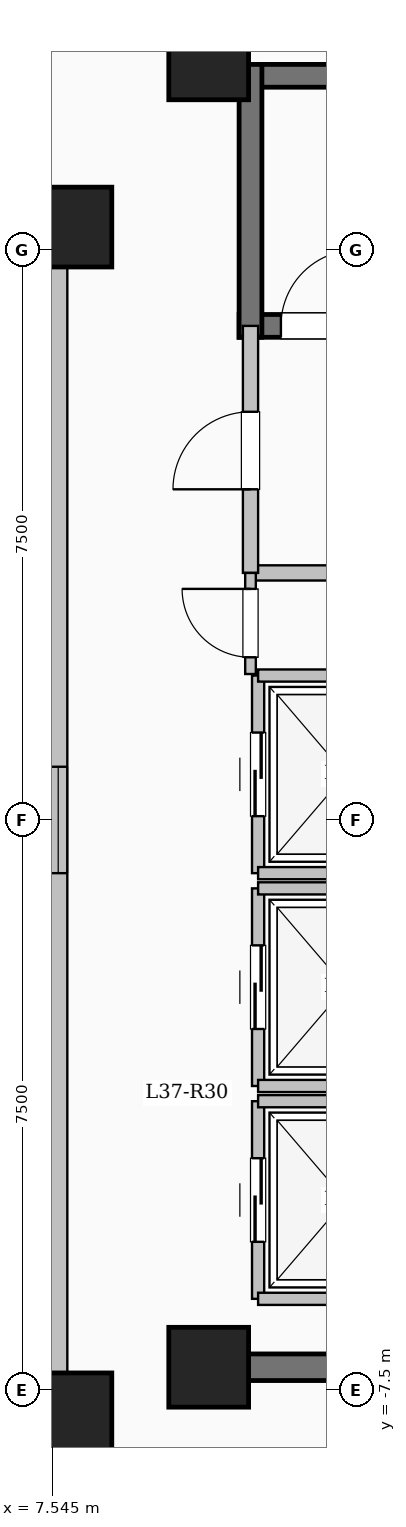
"""IFC4 building model, lengths in metres.
Left out: names, types, materials, properties, quantities, classifications, styles, units other than length and angle.
Written with IfcOpenShell. Run it as: python <this file> out.ifc"""

import sys

from ifc_helpers import new_model, si_unit, direction, frame, frame_2d, origin, origin_2d, place, context, subcontext, project, spatial, rectangle, extrude, element, fill, save


model = new_model("IFC4")
c1 = context("Model", 3, precision=1e-05, world=origin(), true_north=direction((0.0, 1.0)))
c2 = subcontext(c1, "Body", "Model", "MODEL_VIEW")
j1 = project(units=[si_unit("LENGTHUNIT", "METRE"), si_unit("PLANEANGLEUNIT", "RADIAN")], contexts=[c1])
p1 = place(None, origin())
s1 = spatial("IfcSite", under=j1, at=p1, CompositionType="ELEMENT")
p2 = place(p1, origin())
s2 = spatial("IfcBuilding", under=s1, at=p2, CompositionType="ELEMENT")
p3 = place(p2, frame((0.0, 0.0, 139.3)))
s3 = spatial("IfcBuildingStorey", under=s2, at=p3, CompositionType="ELEMENT", Elevation=139.3)
for number, where, z_axis, x_axis in (
    (1, (7.8, -7.8, 0.0), (0.0, 0.0, 1.0), (1.0, 0.0, 0.0)),
    (2, (7.8, 7.8, 0.0), (0.0, 0.0, 1.0), (1.0, 0.0, 0.0)),
    (3, (9.6, -7.2, 0.0), (0.0, 0.0, 1.0), (1.0, 0.0, 0.0)),
    (4, (9.6, 10.0, 0.0), (0.0, 0.0, 1.0), (1.0, 0.0, 0.0)),
):
    element("IfcColumn", number, at=place(p3, frame(where, z_axis=z_axis, x_axis=x_axis)), inside=s3, PredefinedType="COLUMN", context=c2, shape_type="SweptSolid", body=[
        extrude(rectangle(XDim=1.05, YDim=1.05, at=origin_2d()), origin(), (0.0, 0.0, 1.0), 3.35),
    ])
p4 = place(p3, frame((-7.62, -7.62, 0.0), z_axis=(0.0, 0.0, 1.0), x_axis=(1.0, 0.0, 0.0)))
e5 = element("IfcWall", 5, at=p4, inside=s3, PredefinedType="SOLIDWALL", context=c2, shape_type="SweptSolid", body=[
    extrude(rectangle(XDim=15.24, YDim=0.24, at=frame_2d((7.62, 0.0))), origin(), (0.0, 0.0, 1.0), 3.1),
])
p5 = place(p4, frame((6.92, 0.0, 0.95)))
e6 = element("IfcOpeningElement", 6, at=p5, cuts=e5, PredefinedType="OPENING", context=c2, shape_type="SweptSolid", body=[
    extrude(rectangle(XDim=1.4, YDim=1.5, at=frame_2d((0.7, 0.75))), frame((0.0, 0.13, 0.0), z_axis=(0.0, -1.0, 0.0), x_axis=(1.0, 0.0, 0.0)), (0.0, 0.0, 1.0), 0.26),
])
p6 = place(p3, frame((7.62, -7.62, 0.0), z_axis=(0.0, 0.0, 1.0), x_axis=(0.0, 1.0, 0.0)))
e7 = element("IfcWall", 7, at=p6, inside=s3, PredefinedType="SOLIDWALL", context=c2, shape_type="SweptSolid", body=[
    extrude(rectangle(XDim=15.24, YDim=0.24, at=frame_2d((7.62, 0.0))), origin(), (0.0, 0.0, 1.0), 3.1),
])
p7 = place(p6, frame((6.92, 0.0, 0.95)))
e8 = element("IfcOpeningElement", 8, at=p7, cuts=e7, PredefinedType="OPENING", context=c2, shape_type="SweptSolid", body=[
    extrude(rectangle(XDim=1.4, YDim=1.5, at=frame_2d((0.7, 0.75))), frame((0.0, 0.13, 0.0), z_axis=(0.0, -1.0, 0.0), x_axis=(1.0, 0.0, 0.0)), (0.0, 0.0, 1.0), 0.26),
])
p8 = place(p3, frame((7.62, 7.62, 0.0), z_axis=(0.0, 0.0, 1.0), x_axis=(-1.0, 0.0, 0.0)))
e9 = element("IfcWall", 9, at=p8, inside=s3, PredefinedType="SOLIDWALL", context=c2, shape_type="SweptSolid", body=[
    extrude(rectangle(XDim=15.24, YDim=0.24, at=frame_2d((7.62, 0.0))), origin(), (0.0, 0.0, 1.0), 3.1),
])
p9 = place(p8, frame((6.92, 0.0, 0.95)))
e10 = element("IfcOpeningElement", 10, at=p9, cuts=e9, PredefinedType="OPENING", context=c2, shape_type="SweptSolid", body=[
    extrude(rectangle(XDim=1.4, YDim=1.5, at=frame_2d((0.7, 0.75))), frame((0.0, 0.13, 0.0), z_axis=(0.0, -1.0, 0.0), x_axis=(1.0, 0.0, 0.0)), (0.0, 0.0, 1.0), 0.26),
])
p10 = place(p3, frame((10.0, 9.79, 0.0), z_axis=(0.0, 0.0, 1.0), x_axis=(1.0, 0.0, 0.0)))
e11 = element("IfcWall", 11, at=p10, inside=s3, PredefinedType="SHEAR", context=c2, shape_type="SweptSolid", body=[
    extrude(rectangle(XDim=8.0, YDim=0.3, at=frame_2d((4.0, 0.0))), origin(), (0.0, 0.0, 1.0), 3.35),
])
p11 = place(p3, frame((10.0, 6.5, 0.0), z_axis=(0.0, 0.0, 1.0), x_axis=(1.0, 0.0, 0.0)))
e12 = element("IfcWall", 12, at=p11, inside=s3, PredefinedType="SHEAR", context=c2, shape_type="SweptSolid", body=[
    extrude(rectangle(XDim=8.0, YDim=0.3, at=frame_2d((4.0, 0.0))), origin(), (0.0, 0.0, 1.0), 3.35),
])
p12 = place(p11, frame((0.55, 0.0, 0.0)))
e13 = element("IfcOpeningElement", 13, at=p12, cuts=e12, PredefinedType="OPENING", context=c2, shape_type="SweptSolid", body=[
    extrude(rectangle(XDim=1.0, YDim=2.15, at=frame_2d((0.5, 1.075))), frame((0.0, 0.16, 0.0), z_axis=(0.0, -1.0, 0.0), x_axis=(1.0, 0.0, 0.0)), (0.0, 0.0, 1.0), 0.32),
])
p13 = place(p3, frame((10.15, 6.35, 0.0), z_axis=(0.0, 0.0, 1.0), x_axis=(0.0, 1.0, 0.0)))
e14 = element("IfcWall", 14, at=p13, inside=s3, PredefinedType="SHEAR", context=c2, shape_type="SweptSolid", body=[
    extrude(rectangle(XDim=3.59, YDim=0.3, at=frame_2d((1.795, 0.0))), origin(), (0.0, 0.0, 1.0), 3.35),
])
p14 = place(p3, frame((10.15, 3.25, 0.0), z_axis=(0.0, 0.0, 1.0), x_axis=(1.0, 0.0, 0.0)))
e15 = element("IfcWall", 15, at=p14, inside=s3, PredefinedType="SOLIDWALL", context=c2, shape_type="SweptSolid", body=[
    extrude(rectangle(XDim=5.4, YDim=0.2, at=frame_2d((2.7, 0.0))), origin(), (0.0, 0.0, 1.0), 3.1),
])
p15 = place(p3, frame((10.15, 3.25, 0.0), z_axis=(0.0, 0.0, 1.0), x_axis=(0.0, 1.0, 0.0)))
e16 = element("IfcWall", 16, at=p15, inside=s3, PredefinedType="SOLIDWALL", context=c2, shape_type="SweptSolid", body=[
    extrude(rectangle(XDim=3.25, YDim=0.2, at=frame_2d((1.625, 0.0))), origin(), (0.0, 0.0, 1.0), 3.1),
])
p16 = place(p15, frame((1.1, 0.0, 0.0)))
e17 = element("IfcOpeningElement", 17, at=p16, cuts=e16, PredefinedType="OPENING", context=c2, shape_type="SweptSolid", body=[
    extrude(rectangle(XDim=1.02, YDim=2.15, at=frame_2d((0.51, 1.075))), frame((0.0, 0.11, 0.0), z_axis=(0.0, -1.0, 0.0), x_axis=(1.0, 0.0, 0.0)), (0.0, 0.0, 1.0), 0.22),
])
p17 = place(p3, frame((10.25, -6.3, 0.0), z_axis=(0.0, 0.0, 1.0), x_axis=(0.0, 1.0, 0.0)))
e18 = element("IfcWall", 18, at=p17, inside=s3, PredefinedType="SOLIDWALL", context=c2, shape_type="SweptSolid", body=[
    extrude(rectangle(XDim=2.6, YDim=0.16, at=frame_2d((1.3, 0.0))), origin(), (0.0, 0.0, 1.0), 3.1),
])
p18 = place(p17, frame((0.75, 0.0, 0.0)))
e19 = element("IfcOpeningElement", 19, at=p18, cuts=e18, PredefinedType="OPENING", context=c2, shape_type="SweptSolid", body=[
    extrude(rectangle(XDim=1.1, YDim=2.15, at=frame_2d((0.55, 1.075))), frame((0.0, 0.09, 0.0), z_axis=(0.0, -1.0, 0.0), x_axis=(1.0, 0.0, 0.0)), (0.0, 0.0, 1.0), 0.18),
])
for number, where, z_axis, x_axis in (
    (20, (10.25, -6.3, 0.0), (0.0, 0.0, 1.0), (1.0, 0.0, 0.0)),
    (21, (10.25, -3.7, 0.0), (0.0, 0.0, 1.0), (1.0, 0.0, 0.0)),
):
    element("IfcWall", number, at=place(p3, frame(where, z_axis=z_axis, x_axis=x_axis)), inside=s3, PredefinedType="SOLIDWALL", context=c2, shape_type="SweptSolid", body=[
        extrude(rectangle(XDim=2.3, YDim=0.16, at=frame_2d((1.15, 0.0))), origin(), (0.0, 0.0, 1.0), 3.1),
    ])
p19 = place(p3, frame((10.25, -3.5, 0.0), z_axis=(0.0, 0.0, 1.0), x_axis=(0.0, 1.0, 0.0)))
e22 = element("IfcWall", 22, at=p19, inside=s3, PredefinedType="SOLIDWALL", context=c2, shape_type="SweptSolid", body=[
    extrude(rectangle(XDim=2.6, YDim=0.16, at=frame_2d((1.3, 0.0))), origin(), (0.0, 0.0, 1.0), 3.1),
])
p20 = place(p19, frame((0.75, 0.0, 0.0)))
e23 = element("IfcOpeningElement", 23, at=p20, cuts=e22, PredefinedType="OPENING", context=c2, shape_type="SweptSolid", body=[
    extrude(rectangle(XDim=1.1, YDim=2.15, at=frame_2d((0.55, 1.075))), frame((0.0, 0.09, 0.0), z_axis=(0.0, -1.0, 0.0), x_axis=(1.0, 0.0, 0.0)), (0.0, 0.0, 1.0), 0.18),
])
for number, where, z_axis, x_axis in (
    (24, (10.25, -3.5, 0.0), (0.0, 0.0, 1.0), (1.0, 0.0, 0.0)),
    (25, (10.25, -0.9, 0.0), (0.0, 0.0, 1.0), (1.0, 0.0, 0.0)),
):
    element("IfcWall", number, at=place(p3, frame(where, z_axis=z_axis, x_axis=x_axis)), inside=s3, PredefinedType="SOLIDWALL", context=c2, shape_type="SweptSolid", body=[
        extrude(rectangle(XDim=2.3, YDim=0.16, at=frame_2d((1.15, 0.0))), origin(), (0.0, 0.0, 1.0), 3.1),
    ])
p21 = place(p3, frame((10.25, -0.7, 0.0), z_axis=(0.0, 0.0, 1.0), x_axis=(0.0, 1.0, 0.0)))
e26 = element("IfcWall", 26, at=p21, inside=s3, PredefinedType="SOLIDWALL", context=c2, shape_type="SweptSolid", body=[
    extrude(rectangle(XDim=2.6, YDim=0.16, at=frame_2d((1.3, 0.0))), origin(), (0.0, 0.0, 1.0), 3.1),
])
p22 = place(p21, frame((0.75, 0.0, 0.0)))
e27 = element("IfcOpeningElement", 27, at=p22, cuts=e26, PredefinedType="OPENING", context=c2, shape_type="SweptSolid", body=[
    extrude(rectangle(XDim=1.1, YDim=2.15, at=frame_2d((0.55, 1.075))), frame((0.0, 0.09, 0.0), z_axis=(0.0, -1.0, 0.0), x_axis=(1.0, 0.0, 0.0)), (0.0, 0.0, 1.0), 0.18),
])
for number, where, z_axis, x_axis in (
    (28, (10.25, -0.7, 0.0), (0.0, 0.0, 1.0), (1.0, 0.0, 0.0)),
    (29, (10.25, 1.9, 0.0), (0.0, 0.0, 1.0), (1.0, 0.0, 0.0)),
):
    element("IfcWall", number, at=place(p3, frame(where, z_axis=z_axis, x_axis=x_axis)), inside=s3, PredefinedType="SOLIDWALL", context=c2, shape_type="SweptSolid", body=[
        extrude(rectangle(XDim=2.3, YDim=0.16, at=frame_2d((1.15, 0.0))), origin(), (0.0, 0.0, 1.0), 3.1),
    ])
p23 = place(p3, frame((10.075, -7.2, 0.0), z_axis=(0.0, 0.0, 1.0), x_axis=(1.0, 0.0, 0.0)))
e30 = element("IfcWall", 30, at=p23, inside=s3, PredefinedType="SHEAR", context=c2, shape_type="SweptSolid", body=[
    extrude(rectangle(XDim=8.55, YDim=0.35, at=frame_2d((4.275, 0.0))), origin(), (0.0, 0.0, 1.0), 3.35),
])
p24 = place(p3, frame((10.15, 1.92, 0.0), z_axis=(0.0, 0.0, 1.0), x_axis=(0.0, 1.0, 0.0)))
e31 = element("IfcWall", 31, at=p24, inside=s3, PredefinedType="PARTITIONING", context=c2, shape_type="SweptSolid", body=[
    extrude(rectangle(XDim=1.33, YDim=0.14, at=frame_2d((0.665, 0.0))), origin(), (0.0, 0.0, 1.0), 3.1),
])
p25 = place(p24, frame((0.22, 0.0, 0.0)))
e32 = element("IfcOpeningElement", 32, at=p25, cuts=e31, PredefinedType="OPENING", context=c2, shape_type="SweptSolid", body=[
    extrude(rectangle(XDim=0.9, YDim=2.08, at=frame_2d((0.45, 1.04))), frame((0.0, 0.08, 0.0), z_axis=(0.0, -1.0, 0.0), x_axis=(1.0, 0.0, 0.0)), (0.0, 0.0, 1.0), 0.16),
])
p26 = place(p7, origin())
e33 = element("IfcWindow", 33, at=p26, inside=s3, PartitioningType="SINGLE_PANEL", PredefinedType="WINDOW", context=c2, shape_type="SweptSolid", body=[
    extrude(rectangle(XDim=1.4, YDim=1.5, at=frame_2d((0.7, 0.75))), frame((0.0, 0.03, 0.0), z_axis=(0.0, -1.0, 0.0), x_axis=(1.0, 0.0, 0.0)), (0.0, 0.0, 1.0), 0.06),
])
fill(e8, e33)
p27 = place(p12, origin())
e34 = element("IfcDoor", 34, at=p27, inside=s3, OperationType="SINGLE_SWING_RIGHT", PredefinedType="DOOR", context=c2, shape_type="SweptSolid", body=[
    extrude(rectangle(XDim=1.0, YDim=2.15, at=frame_2d((0.5, 1.075))), frame((0.0, 0.025, 0.0), z_axis=(0.0, -1.0, 0.0), x_axis=(1.0, 0.0, 0.0)), (0.0, 0.0, 1.0), 0.05),
])
fill(e13, e34)
p28 = place(p16, origin())
e35 = element("IfcDoor", 35, at=p28, inside=s3, OperationType="SINGLE_SWING_LEFT", PredefinedType="DOOR", context=c2, shape_type="SweptSolid", body=[
    extrude(rectangle(XDim=1.02, YDim=2.15, at=frame_2d((0.51, 1.075))), frame((0.0, 0.025, 0.0), z_axis=(0.0, -1.0, 0.0), x_axis=(1.0, 0.0, 0.0)), (0.0, 0.0, 1.0), 0.05),
])
fill(e17, e35)
p29 = place(p18, origin())
e36 = element("IfcDoor", 36, at=p29, inside=s3, OperationType="SLIDING_TO_LEFT", PredefinedType="DOOR", context=c2, shape_type="SweptSolid", body=[
    extrude(rectangle(XDim=1.1, YDim=2.15, at=frame_2d((0.55, 1.075))), frame((0.0, 0.025, 0.0), z_axis=(0.0, -1.0, 0.0), x_axis=(1.0, 0.0, 0.0)), (0.0, 0.0, 1.0), 0.05),
])
fill(e19, e36)
p30 = place(p20, origin())
e37 = element("IfcDoor", 37, at=p30, inside=s3, OperationType="SLIDING_TO_LEFT", PredefinedType="DOOR", context=c2, shape_type="SweptSolid", body=[
    extrude(rectangle(XDim=1.1, YDim=2.15, at=frame_2d((0.55, 1.075))), frame((0.0, 0.025, 0.0), z_axis=(0.0, -1.0, 0.0), x_axis=(1.0, 0.0, 0.0)), (0.0, 0.0, 1.0), 0.05),
])
fill(e23, e37)
p31 = place(p22, origin())
e38 = element("IfcDoor", 38, at=p31, inside=s3, OperationType="SLIDING_TO_LEFT", PredefinedType="DOOR", context=c2, shape_type="SweptSolid", body=[
    extrude(rectangle(XDim=1.1, YDim=2.15, at=frame_2d((0.55, 1.075))), frame((0.0, 0.025, 0.0), z_axis=(0.0, -1.0, 0.0), x_axis=(1.0, 0.0, 0.0)), (0.0, 0.0, 1.0), 0.05),
])
fill(e27, e38)
p32 = place(p25, origin())
e39 = element("IfcDoor", 39, at=p32, inside=s3, OperationType="SINGLE_SWING_RIGHT", PredefinedType="DOOR", context=c2, shape_type="SweptSolid", body=[
    extrude(rectangle(XDim=0.9, YDim=2.08, at=frame_2d((0.45, 1.04))), frame((0.0, 0.025, 0.0), z_axis=(0.0, -1.0, 0.0), x_axis=(1.0, 0.0, 0.0)), (0.0, 0.0, 1.0), 0.05),
])
fill(e32, e39)
save(model, sys.argv[1])
